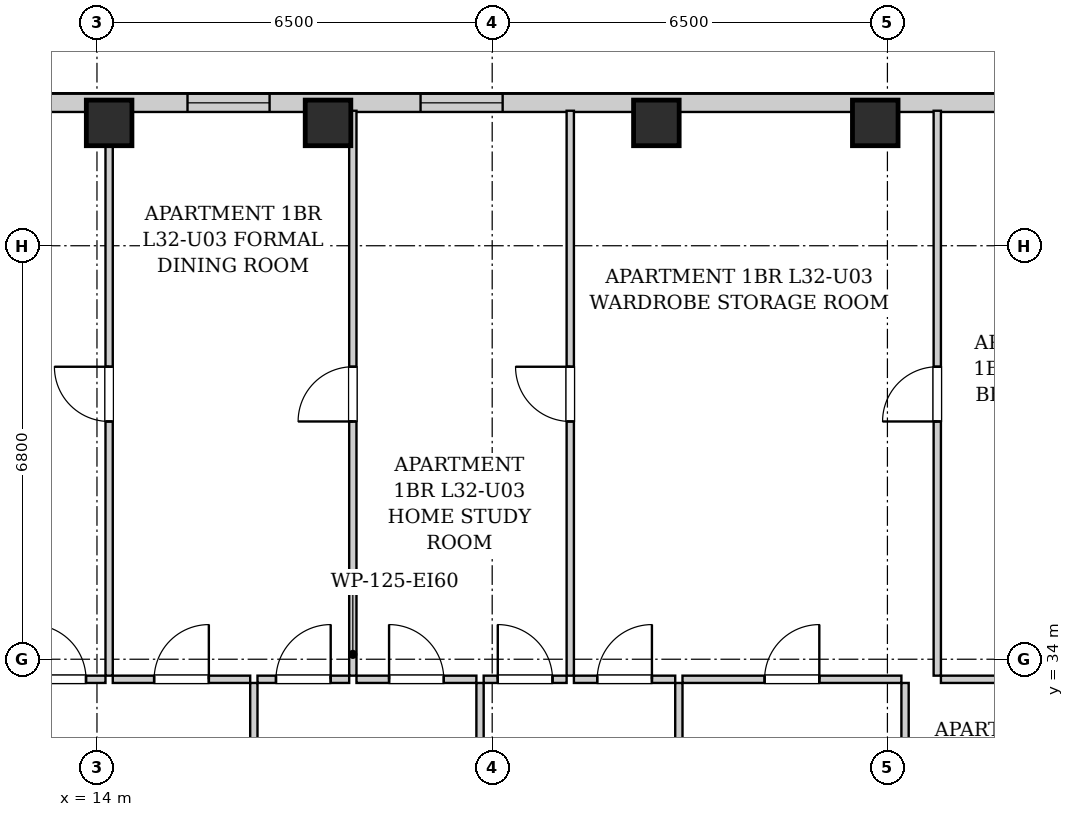
"""IFC4 building model, lengths in metres.
Left out: names, types, materials, properties, quantities, classifications, styles, units other than length and angle.
Written with IfcOpenShell. Run it as: python <this file> out.ifc"""

import sys

from ifc_helpers import new_model, si_unit, direction, frame, frame_2d, origin, origin_2d, place, context, subcontext, project, spatial, rectangle, extrude, element, fill, save


model = new_model("IFC4")
c1 = context("Model", 3, precision=1e-05, world=origin(), true_north=direction((0.0, 1.0)))
c2 = subcontext(c1, "Body", "Model", "MODEL_VIEW")
j1 = project(units=[si_unit("LENGTHUNIT", "METRE"), si_unit("PLANEANGLEUNIT", "RADIAN")], contexts=[c1])
p1 = place(None, origin())
s1 = spatial("IfcSite", under=j1, at=p1, CompositionType="ELEMENT")
p2 = place(p1, origin())
s2 = spatial("IfcBuilding", under=s1, at=p2, CompositionType="ELEMENT")
p3 = place(p2, frame((0.0, 0.0, 113.5)))
s3 = spatial("IfcBuildingStorey", under=s2, at=p3, CompositionType="ELEMENT", Elevation=113.5)
for number, where, z_axis, x_axis in (
    (1, (14.2, 42.82, 0.0), (0.0, 0.0, 1.0), (1.0, 0.0, 0.0)),
    (2, (17.8, 42.82, 0.0), (0.0, 0.0, 1.0), (1.0, 0.0, 0.0)),
    (3, (23.2, 42.82, 0.0), (0.0, 0.0, 1.0), (1.0, 0.0, 0.0)),
    (4, (26.8, 42.82, 0.0), (0.0, 0.0, 1.0), (1.0, 0.0, 0.0)),
):
    element("IfcColumn", number, at=place(p3, frame(where, z_axis=z_axis, x_axis=x_axis)), inside=s3, PredefinedType="COLUMN", context=c2, shape_type="SweptSolid", body=[
        extrude(rectangle(XDim=0.75, YDim=0.75, at=origin_2d()), origin(), (0.0, 0.0, 1.0), 3.2),
    ])
p4 = place(p3, frame((10.0, 43.15, 0.0), z_axis=(0.0, 0.0, 1.0), x_axis=(1.0, 0.0, 0.0)))
e5 = element("IfcWall", 5, at=p4, inside=s3, PredefinedType="SOLIDWALL", context=c2, shape_type="SweptSolid", body=[
    extrude(rectangle(XDim=21.95, YDim=0.3, at=frame_2d((10.975, 0.0))), origin(), (0.0, 0.0, 1.0), 2.94),
])
p5 = place(p4, frame((5.489, 0.0, 0.55)))
e6 = element("IfcOpeningElement", 6, at=p5, cuts=e5, PredefinedType="OPENING", context=c2, shape_type="SweptSolid", body=[
    extrude(rectangle(XDim=1.35, YDim=1.2, at=frame_2d((0.675, 0.6))), frame((0.0, 0.16, 0.0), z_axis=(0.0, -1.0, 0.0), x_axis=(1.0, 0.0, 0.0)), (0.0, 0.0, 1.0), 0.32),
])
p6 = place(p4, frame((9.322, 0.0, 0.55)))
e7 = element("IfcOpeningElement", 7, at=p6, cuts=e5, PredefinedType="OPENING", context=c2, shape_type="SweptSolid", body=[
    extrude(rectangle(XDim=1.35, YDim=1.2, at=frame_2d((0.675, 0.6))), frame((0.0, 0.16, 0.0), z_axis=(0.0, -1.0, 0.0), x_axis=(1.0, 0.0, 0.0)), (0.0, 0.0, 1.0), 0.32),
])
p7 = place(p4, frame((18.869, 0.0, 0.55)))
e8 = element("IfcOpeningElement", 8, at=p7, cuts=e5, PredefinedType="OPENING", context=c2, shape_type="SweptSolid", body=[
    extrude(rectangle(XDim=1.35, YDim=1.2, at=frame_2d((0.675, 0.6))), frame((0.0, 0.16, 0.0), z_axis=(0.0, -1.0, 0.0), x_axis=(1.0, 0.0, 0.0)), (0.0, 0.0, 1.0), 0.32),
])
p8 = place(p3, frame((16.58, 30.76, 0.0), z_axis=(0.0, 0.0, 1.0), x_axis=(0.0, 1.0, 0.0)))
e9 = element("IfcWall", 9, at=p8, inside=s3, PredefinedType="PARTITIONING", context=c2, shape_type="SweptSolid", body=[
    extrude(rectangle(XDim=2.85, YDim=0.12, at=frame_2d((1.425, 0.0))), origin(), (0.0, 0.0, 1.0), 2.94),
])
p9 = place(p8, frame((0.975, 0.0, 0.0)))
e10 = element("IfcOpeningElement", 10, at=p9, cuts=e9, PredefinedType="OPENING", context=c2, shape_type="SweptSolid", body=[
    extrude(rectangle(XDim=0.9, YDim=2.05, at=frame_2d((0.45, 1.025))), frame((0.0, 0.07, 0.0), z_axis=(0.0, -1.0, 0.0), x_axis=(1.0, 0.0, 0.0)), (0.0, 0.0, 1.0), 0.14),
])
p10 = place(p3, frame((12.6, 33.67, 0.0), z_axis=(0.0, 0.0, 1.0), x_axis=(1.0, 0.0, 0.0)))
e11 = element("IfcWall", 11, at=p10, inside=s3, PredefinedType="PARTITIONING", context=c2, shape_type="SweptSolid", body=[
    extrude(rectangle(XDim=1.54, YDim=0.12, at=frame_2d((0.77, 0.0))), origin(), (0.0, 0.0, 1.0), 2.94),
])
p11 = place(p10, frame((0.32, 0.0, 0.0)))
e12 = element("IfcOpeningElement", 12, at=p11, cuts=e11, PredefinedType="OPENING", context=c2, shape_type="SweptSolid", body=[
    extrude(rectangle(XDim=0.9, YDim=2.05, at=frame_2d((0.45, 1.025))), frame((0.0, 0.07, 0.0), z_axis=(0.0, -1.0, 0.0), x_axis=(1.0, 0.0, 0.0)), (0.0, 0.0, 1.0), 0.14),
])
p12 = place(p3, frame((14.26, 33.67, 0.0), z_axis=(0.0, 0.0, 1.0), x_axis=(1.0, 0.0, 0.0)))
e13 = element("IfcWall", 13, at=p12, inside=s3, PredefinedType="PARTITIONING", context=c2, shape_type="SweptSolid", body=[
    extrude(rectangle(XDim=2.26, YDim=0.12, at=frame_2d((1.13, 0.0))), origin(), (0.0, 0.0, 1.0), 2.94),
])
p13 = place(p12, frame((0.68, 0.0, 0.0)))
e14 = element("IfcOpeningElement", 14, at=p13, cuts=e13, PredefinedType="OPENING", context=c2, shape_type="SweptSolid", body=[
    extrude(rectangle(XDim=0.9, YDim=2.05, at=frame_2d((0.45, 1.025))), frame((0.0, 0.07, 0.0), z_axis=(0.0, -1.0, 0.0), x_axis=(1.0, 0.0, 0.0)), (0.0, 0.0, 1.0), 0.14),
])
p14 = place(p3, frame((20.3, 30.76, 0.0), z_axis=(0.0, 0.0, 1.0), x_axis=(0.0, 1.0, 0.0)))
e15 = element("IfcWall", 15, at=p14, inside=s3, PredefinedType="PARTITIONING", context=c2, shape_type="SweptSolid", body=[
    extrude(rectangle(XDim=2.85, YDim=0.12, at=frame_2d((1.425, 0.0))), origin(), (0.0, 0.0, 1.0), 2.94),
])
p15 = place(p14, frame((0.975, 0.0, 0.0)))
e16 = element("IfcOpeningElement", 16, at=p15, cuts=e15, PredefinedType="OPENING", context=c2, shape_type="SweptSolid", body=[
    extrude(rectangle(XDim=0.9, YDim=2.05, at=frame_2d((0.45, 1.025))), frame((0.0, 0.07, 0.0), z_axis=(0.0, -1.0, 0.0), x_axis=(1.0, 0.0, 0.0)), (0.0, 0.0, 1.0), 0.14),
])
p16 = place(p3, frame((16.64, 33.67, 0.0), z_axis=(0.0, 0.0, 1.0), x_axis=(1.0, 0.0, 0.0)))
e17 = element("IfcWall", 17, at=p16, inside=s3, PredefinedType="PARTITIONING", context=c2, shape_type="SweptSolid", body=[
    extrude(rectangle(XDim=1.508, YDim=0.12, at=frame_2d((0.754, 0.0))), origin(), (0.0, 0.0, 1.0), 2.94),
])
p17 = place(p16, frame((0.304, 0.0, 0.0)))
e18 = element("IfcOpeningElement", 18, at=p17, cuts=e17, PredefinedType="OPENING", context=c2, shape_type="SweptSolid", body=[
    extrude(rectangle(XDim=0.9, YDim=2.05, at=frame_2d((0.45, 1.025))), frame((0.0, 0.07, 0.0), z_axis=(0.0, -1.0, 0.0), x_axis=(1.0, 0.0, 0.0)), (0.0, 0.0, 1.0), 0.14),
])
p18 = place(p3, frame((18.268, 33.67, 0.0), z_axis=(0.0, 0.0, 1.0), x_axis=(1.0, 0.0, 0.0)))
e19 = element("IfcWall", 19, at=p18, inside=s3, PredefinedType="PARTITIONING", context=c2, shape_type="SweptSolid", body=[
    extrude(rectangle(XDim=1.972, YDim=0.12, at=frame_2d((0.986, 0.0))), origin(), (0.0, 0.0, 1.0), 2.94),
])
p19 = place(p18, frame((0.536, 0.0, 0.0)))
e20 = element("IfcOpeningElement", 20, at=p19, cuts=e19, PredefinedType="OPENING", context=c2, shape_type="SweptSolid", body=[
    extrude(rectangle(XDim=0.9, YDim=2.05, at=frame_2d((0.45, 1.025))), frame((0.0, 0.07, 0.0), z_axis=(0.0, -1.0, 0.0), x_axis=(1.0, 0.0, 0.0)), (0.0, 0.0, 1.0), 0.14),
])
p20 = place(p3, frame((23.57, 30.76, 0.0), z_axis=(0.0, 0.0, 1.0), x_axis=(0.0, 1.0, 0.0)))
e21 = element("IfcWall", 21, at=p20, inside=s3, PredefinedType="PARTITIONING", context=c2, shape_type="SweptSolid", body=[
    extrude(rectangle(XDim=2.85, YDim=0.12, at=frame_2d((1.425, 0.0))), origin(), (0.0, 0.0, 1.0), 2.94),
])
p21 = place(p20, frame((0.975, 0.0, 0.0)))
e22 = element("IfcOpeningElement", 22, at=p21, cuts=e21, PredefinedType="OPENING", context=c2, shape_type="SweptSolid", body=[
    extrude(rectangle(XDim=0.9, YDim=2.05, at=frame_2d((0.45, 1.025))), frame((0.0, 0.07, 0.0), z_axis=(0.0, -1.0, 0.0), x_axis=(1.0, 0.0, 0.0)), (0.0, 0.0, 1.0), 0.14),
])
p22 = place(p3, frame((20.36, 33.67, 0.0), z_axis=(0.0, 0.0, 1.0), x_axis=(1.0, 0.0, 0.0)))
e23 = element("IfcWall", 23, at=p22, inside=s3, PredefinedType="PARTITIONING", context=c2, shape_type="SweptSolid", body=[
    extrude(rectangle(XDim=1.364, YDim=0.12, at=frame_2d((0.682, 0.0))), origin(), (0.0, 0.0, 1.0), 2.94),
])
p23 = place(p22, frame((0.232, 0.0, 0.0)))
e24 = element("IfcOpeningElement", 24, at=p23, cuts=e23, PredefinedType="OPENING", context=c2, shape_type="SweptSolid", body=[
    extrude(rectangle(XDim=0.9, YDim=2.05, at=frame_2d((0.45, 1.025))), frame((0.0, 0.07, 0.0), z_axis=(0.0, -1.0, 0.0), x_axis=(1.0, 0.0, 0.0)), (0.0, 0.0, 1.0), 0.14),
])
p24 = place(p3, frame((21.844, 33.67, 0.0), z_axis=(0.0, 0.0, 1.0), x_axis=(1.0, 0.0, 0.0)))
e25 = element("IfcWall", 25, at=p24, inside=s3, PredefinedType="PARTITIONING", context=c2, shape_type="SweptSolid", body=[
    extrude(rectangle(XDim=1.666, YDim=0.12, at=frame_2d((0.833, 0.0))), origin(), (0.0, 0.0, 1.0), 2.94),
])
p25 = place(p24, frame((0.383, 0.0, 0.0)))
e26 = element("IfcOpeningElement", 26, at=p25, cuts=e25, PredefinedType="OPENING", context=c2, shape_type="SweptSolid", body=[
    extrude(rectangle(XDim=0.9, YDim=2.05, at=frame_2d((0.45, 1.025))), frame((0.0, 0.07, 0.0), z_axis=(0.0, -1.0, 0.0), x_axis=(1.0, 0.0, 0.0)), (0.0, 0.0, 1.0), 0.14),
])
p26 = place(p3, frame((27.29, 30.76, 0.0), z_axis=(0.0, 0.0, 1.0), x_axis=(0.0, 1.0, 0.0)))
e27 = element("IfcWall", 27, at=p26, inside=s3, PredefinedType="PARTITIONING", context=c2, shape_type="SweptSolid", body=[
    extrude(rectangle(XDim=2.85, YDim=0.12, at=frame_2d((1.425, 0.0))), origin(), (0.0, 0.0, 1.0), 2.94),
])
p27 = place(p26, frame((0.975, 0.0, 0.0)))
e28 = element("IfcOpeningElement", 28, at=p27, cuts=e27, PredefinedType="OPENING", context=c2, shape_type="SweptSolid", body=[
    extrude(rectangle(XDim=0.9, YDim=2.05, at=frame_2d((0.45, 1.025))), frame((0.0, 0.07, 0.0), z_axis=(0.0, -1.0, 0.0), x_axis=(1.0, 0.0, 0.0)), (0.0, 0.0, 1.0), 0.14),
])
p28 = place(p3, frame((23.63, 33.67, 0.0), z_axis=(0.0, 0.0, 1.0), x_axis=(1.0, 0.0, 0.0)))
e29 = element("IfcWall", 29, at=p28, inside=s3, PredefinedType="PARTITIONING", context=c2, shape_type="SweptSolid", body=[
    extrude(rectangle(XDim=3.6, YDim=0.12, at=frame_2d((1.8, 0.0))), origin(), (0.0, 0.0, 1.0), 2.94),
])
p29 = place(p28, frame((1.35, 0.0, 0.0)))
e30 = element("IfcOpeningElement", 30, at=p29, cuts=e29, PredefinedType="OPENING", context=c2, shape_type="SweptSolid", body=[
    extrude(rectangle(XDim=0.9, YDim=2.05, at=frame_2d((0.45, 1.025))), frame((0.0, 0.07, 0.0), z_axis=(0.0, -1.0, 0.0), x_axis=(1.0, 0.0, 0.0)), (0.0, 0.0, 1.0), 0.14),
])
p30 = place(p3, frame((27.88, 33.67, 0.0), z_axis=(0.0, 0.0, 1.0), x_axis=(1.0, 0.0, 0.0)))
e31 = element("IfcWall", 31, at=p30, inside=s3, PredefinedType="PARTITIONING", context=c2, shape_type="SweptSolid", body=[
    extrude(rectangle(XDim=3.24, YDim=0.12, at=frame_2d((1.62, 0.0))), origin(), (0.0, 0.0, 1.0), 2.94),
])
p31 = place(p30, frame((1.17, 0.0, 0.0)))
e32 = element("IfcOpeningElement", 32, at=p31, cuts=e31, PredefinedType="OPENING", context=c2, shape_type="SweptSolid", body=[
    extrude(rectangle(XDim=0.9, YDim=2.05, at=frame_2d((0.45, 1.025))), frame((0.0, 0.07, 0.0), z_axis=(0.0, -1.0, 0.0), x_axis=(1.0, 0.0, 0.0)), (0.0, 0.0, 1.0), 0.14),
])
p32 = place(p3, frame((14.2, 33.73, 0.0), z_axis=(0.0, 0.0, 1.0), x_axis=(0.0, 1.0, 0.0)))
e33 = element("IfcWall", 33, at=p32, inside=s3, PredefinedType="PARTITIONING", context=c2, shape_type="SweptSolid", body=[
    extrude(rectangle(XDim=9.29, YDim=0.12, at=frame_2d((4.645, 0.0))), origin(), (0.0, 0.0, 1.0), 2.94),
])
p33 = place(p32, frame((4.18, 0.0, 0.0)))
e34 = element("IfcOpeningElement", 34, at=p33, cuts=e33, PredefinedType="OPENING", context=c2, shape_type="SweptSolid", body=[
    extrude(rectangle(XDim=0.9, YDim=2.05, at=frame_2d((0.45, 1.025))), frame((0.0, 0.07, 0.0), z_axis=(0.0, -1.0, 0.0), x_axis=(1.0, 0.0, 0.0)), (0.0, 0.0, 1.0), 0.14),
])
p34 = place(p3, frame((18.208, 33.73, 0.0), z_axis=(0.0, 0.0, 1.0), x_axis=(0.0, 1.0, 0.0)))
e35 = element("IfcWall", 35, at=p34, inside=s3, PredefinedType="PARTITIONING", context=c2, shape_type="SweptSolid", body=[
    extrude(rectangle(XDim=9.29, YDim=0.12, at=frame_2d((4.645, 0.0))), origin(), (0.0, 0.0, 1.0), 2.94),
])
p35 = place(p34, frame((4.18, 0.0, 0.0)))
e36 = element("IfcOpeningElement", 36, at=p35, cuts=e35, PredefinedType="OPENING", context=c2, shape_type="SweptSolid", body=[
    extrude(rectangle(XDim=0.9, YDim=2.05, at=frame_2d((0.45, 1.025))), frame((0.0, 0.07, 0.0), z_axis=(0.0, -1.0, 0.0), x_axis=(1.0, 0.0, 0.0)), (0.0, 0.0, 1.0), 0.14),
])
p36 = place(p3, frame((21.784, 33.73, 0.0), z_axis=(0.0, 0.0, 1.0), x_axis=(0.0, 1.0, 0.0)))
e37 = element("IfcWall", 37, at=p36, inside=s3, PredefinedType="PARTITIONING", context=c2, shape_type="SweptSolid", body=[
    extrude(rectangle(XDim=9.29, YDim=0.12, at=frame_2d((4.645, 0.0))), origin(), (0.0, 0.0, 1.0), 2.94),
])
p37 = place(p36, frame((4.18, 0.0, 0.0)))
e38 = element("IfcOpeningElement", 38, at=p37, cuts=e37, PredefinedType="OPENING", context=c2, shape_type="SweptSolid", body=[
    extrude(rectangle(XDim=0.9, YDim=2.05, at=frame_2d((0.45, 1.025))), frame((0.0, 0.07, 0.0), z_axis=(0.0, -1.0, 0.0), x_axis=(1.0, 0.0, 0.0)), (0.0, 0.0, 1.0), 0.14),
])
p38 = place(p3, frame((27.82, 33.73, 0.0), z_axis=(0.0, 0.0, 1.0), x_axis=(0.0, 1.0, 0.0)))
e39 = element("IfcWall", 39, at=p38, inside=s3, PredefinedType="PARTITIONING", context=c2, shape_type="SweptSolid", body=[
    extrude(rectangle(XDim=9.29, YDim=0.12, at=frame_2d((4.645, 0.0))), origin(), (0.0, 0.0, 1.0), 2.94),
])
p39 = place(p38, frame((4.18, 0.0, 0.0)))
e40 = element("IfcOpeningElement", 40, at=p39, cuts=e39, PredefinedType="OPENING", context=c2, shape_type="SweptSolid", body=[
    extrude(rectangle(XDim=0.9, YDim=2.05, at=frame_2d((0.45, 1.025))), frame((0.0, 0.07, 0.0), z_axis=(0.0, -1.0, 0.0), x_axis=(1.0, 0.0, 0.0)), (0.0, 0.0, 1.0), 0.14),
])
p40 = place(p11, origin())
e41 = element("IfcDoor", 41, at=p40, inside=s3, OperationType="SINGLE_SWING_LEFT", PredefinedType="DOOR", context=c2, shape_type="SweptSolid", body=[
    extrude(rectangle(XDim=0.9, YDim=2.05, at=frame_2d((0.45, 1.025))), frame((0.0, 0.025, 0.0), z_axis=(0.0, -1.0, 0.0), x_axis=(1.0, 0.0, 0.0)), (0.0, 0.0, 1.0), 0.05),
])
fill(e12, e41)
p41 = place(p13, origin())
e42 = element("IfcDoor", 42, at=p41, inside=s3, OperationType="SINGLE_SWING_RIGHT", PredefinedType="DOOR", context=c2, shape_type="SweptSolid", body=[
    extrude(rectangle(XDim=0.9, YDim=2.05, at=frame_2d((0.45, 1.025))), frame((0.0, 0.025, 0.0), z_axis=(0.0, -1.0, 0.0), x_axis=(1.0, 0.0, 0.0)), (0.0, 0.0, 1.0), 0.05),
])
fill(e14, e42)
p42 = place(p17, origin())
e43 = element("IfcDoor", 43, at=p42, inside=s3, OperationType="SINGLE_SWING_RIGHT", PredefinedType="DOOR", context=c2, shape_type="SweptSolid", body=[
    extrude(rectangle(XDim=0.9, YDim=2.05, at=frame_2d((0.45, 1.025))), frame((0.0, 0.025, 0.0), z_axis=(0.0, -1.0, 0.0), x_axis=(1.0, 0.0, 0.0)), (0.0, 0.0, 1.0), 0.05),
])
fill(e18, e43)
p43 = place(p19, origin())
e44 = element("IfcDoor", 44, at=p43, inside=s3, OperationType="SINGLE_SWING_LEFT", PredefinedType="DOOR", context=c2, shape_type="SweptSolid", body=[
    extrude(rectangle(XDim=0.9, YDim=2.05, at=frame_2d((0.45, 1.025))), frame((0.0, 0.025, 0.0), z_axis=(0.0, -1.0, 0.0), x_axis=(1.0, 0.0, 0.0)), (0.0, 0.0, 1.0), 0.05),
])
fill(e20, e44)
p44 = place(p23, origin())
e45 = element("IfcDoor", 45, at=p44, inside=s3, OperationType="SINGLE_SWING_LEFT", PredefinedType="DOOR", context=c2, shape_type="SweptSolid", body=[
    extrude(rectangle(XDim=0.9, YDim=2.05, at=frame_2d((0.45, 1.025))), frame((0.0, 0.025, 0.0), z_axis=(0.0, -1.0, 0.0), x_axis=(1.0, 0.0, 0.0)), (0.0, 0.0, 1.0), 0.05),
])
fill(e24, e45)
p45 = place(p25, origin())
e46 = element("IfcDoor", 46, at=p45, inside=s3, OperationType="SINGLE_SWING_RIGHT", PredefinedType="DOOR", context=c2, shape_type="SweptSolid", body=[
    extrude(rectangle(XDim=0.9, YDim=2.05, at=frame_2d((0.45, 1.025))), frame((0.0, 0.025, 0.0), z_axis=(0.0, -1.0, 0.0), x_axis=(1.0, 0.0, 0.0)), (0.0, 0.0, 1.0), 0.05),
])
fill(e26, e46)
p46 = place(p29, origin())
e47 = element("IfcDoor", 47, at=p46, inside=s3, OperationType="SINGLE_SWING_RIGHT", PredefinedType="DOOR", context=c2, shape_type="SweptSolid", body=[
    extrude(rectangle(XDim=0.9, YDim=2.05, at=frame_2d((0.45, 1.025))), frame((0.0, 0.025, 0.0), z_axis=(0.0, -1.0, 0.0), x_axis=(1.0, 0.0, 0.0)), (0.0, 0.0, 1.0), 0.05),
])
fill(e30, e47)
p47 = place(p33, origin())
e48 = element("IfcDoor", 48, at=p47, inside=s3, OperationType="SINGLE_SWING_RIGHT", PredefinedType="DOOR", context=c2, shape_type="SweptSolid", body=[
    extrude(rectangle(XDim=0.9, YDim=2.05, at=frame_2d((0.45, 1.025))), frame((0.0, 0.025, 0.0), z_axis=(0.0, -1.0, 0.0), x_axis=(1.0, 0.0, 0.0)), (0.0, 0.0, 1.0), 0.05),
])
fill(e34, e48)
p48 = place(p35, origin())
e49 = element("IfcDoor", 49, at=p48, inside=s3, OperationType="SINGLE_SWING_LEFT", PredefinedType="DOOR", context=c2, shape_type="SweptSolid", body=[
    extrude(rectangle(XDim=0.9, YDim=2.05, at=frame_2d((0.45, 1.025))), frame((0.0, 0.025, 0.0), z_axis=(0.0, -1.0, 0.0), x_axis=(1.0, 0.0, 0.0)), (0.0, 0.0, 1.0), 0.05),
])
fill(e36, e49)
p49 = place(p37, origin())
e50 = element("IfcDoor", 50, at=p49, inside=s3, OperationType="SINGLE_SWING_RIGHT", PredefinedType="DOOR", context=c2, shape_type="SweptSolid", body=[
    extrude(rectangle(XDim=0.9, YDim=2.05, at=frame_2d((0.45, 1.025))), frame((0.0, 0.025, 0.0), z_axis=(0.0, -1.0, 0.0), x_axis=(1.0, 0.0, 0.0)), (0.0, 0.0, 1.0), 0.05),
])
fill(e38, e50)
p50 = place(p39, origin())
e51 = element("IfcDoor", 51, at=p50, inside=s3, OperationType="SINGLE_SWING_LEFT", PredefinedType="DOOR", context=c2, shape_type="SweptSolid", body=[
    extrude(rectangle(XDim=0.9, YDim=2.05, at=frame_2d((0.45, 1.025))), frame((0.0, 0.025, 0.0), z_axis=(0.0, -1.0, 0.0), x_axis=(1.0, 0.0, 0.0)), (0.0, 0.0, 1.0), 0.05),
])
fill(e40, e51)
p51 = place(p5, origin())
e52 = element("IfcWindow", 52, at=p51, inside=s3, PartitioningType="SINGLE_PANEL", PredefinedType="WINDOW", context=c2, shape_type="SweptSolid", body=[
    extrude(rectangle(XDim=1.35, YDim=1.2, at=frame_2d((0.675, 0.6))), frame((0.0, 0.03, 0.0), z_axis=(0.0, -1.0, 0.0), x_axis=(1.0, 0.0, 0.0)), (0.0, 0.0, 1.0), 0.06),
])
fill(e6, e52)
p52 = place(p6, origin())
e53 = element("IfcWindow", 53, at=p52, inside=s3, PartitioningType="SINGLE_PANEL", PredefinedType="WINDOW", context=c2, shape_type="SweptSolid", body=[
    extrude(rectangle(XDim=1.35, YDim=1.2, at=frame_2d((0.675, 0.6))), frame((0.0, 0.03, 0.0), z_axis=(0.0, -1.0, 0.0), x_axis=(1.0, 0.0, 0.0)), (0.0, 0.0, 1.0), 0.06),
])
fill(e7, e53)
save(model, sys.argv[1])
